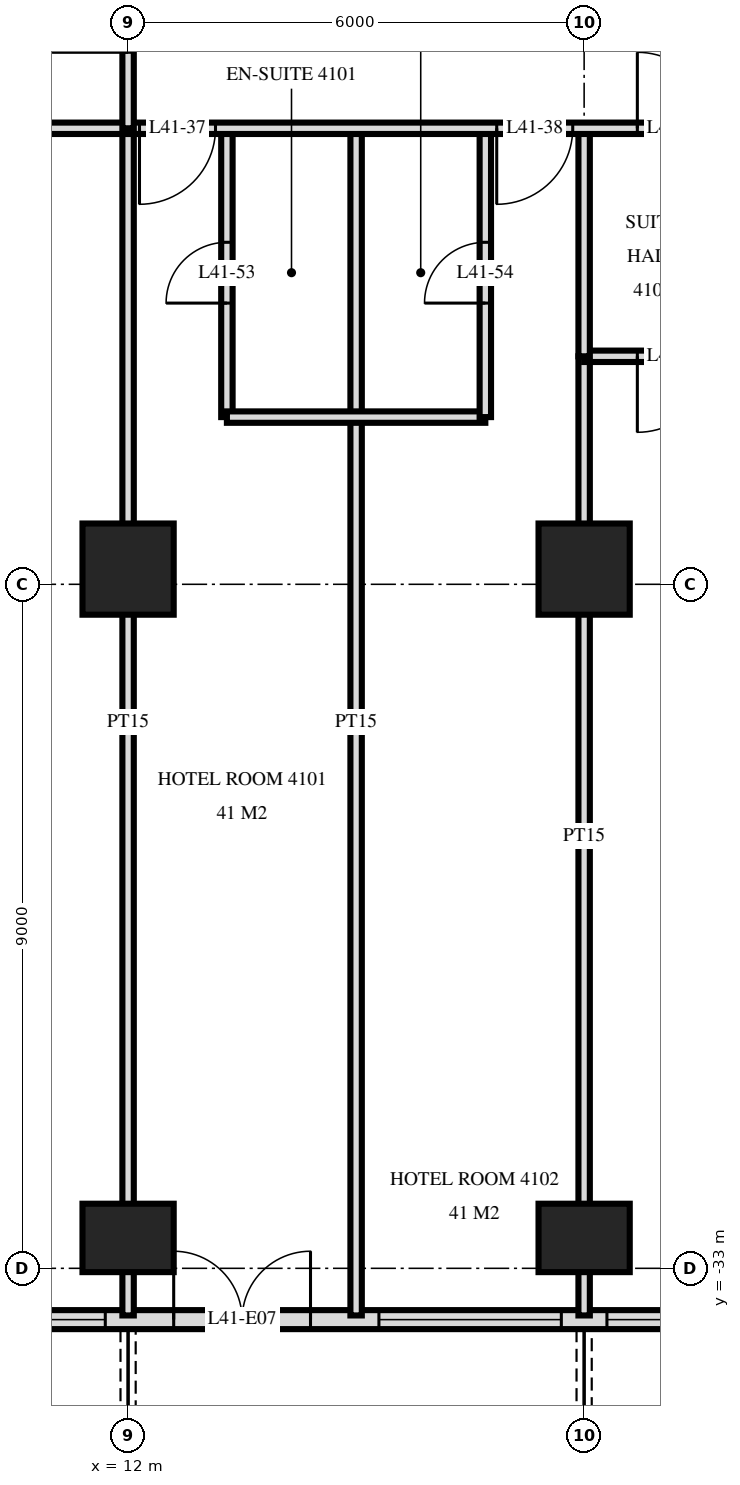
"""IFC4 building model, lengths in metres.
Left out: names, types, materials, properties, quantities, classifications, styles, units other than length and angle.
Written with IfcOpenShell. Run it as: python <this file> out.ifc"""

import sys

from ifc_helpers import new_model, si_unit, direction, frame, frame_2d, origin, origin_2d, place, context, subcontext, project, spatial, rectangle, extrude, element, fill, save


model = new_model("IFC4")
c1 = context("Model", 3, precision=1e-05, world=origin(), true_north=direction((0.0, 1.0)))
c2 = subcontext(c1, "Body", "Model", "MODEL_VIEW")
j1 = project(units=[si_unit("LENGTHUNIT", "METRE"), si_unit("PLANEANGLEUNIT", "RADIAN")], contexts=[c1])
p1 = place(None, origin())
s1 = spatial("IfcSite", under=j1, at=p1, CompositionType="ELEMENT")
p2 = place(p1, origin())
s2 = spatial("IfcBuilding", under=s1, at=p2, CompositionType="ELEMENT")
p3 = place(p2, frame((0.0, 0.0, 159.6)))
s3 = spatial("IfcBuildingStorey", under=s2, at=p3, CompositionType="ELEMENT", Elevation=159.6)
p4 = place(p3, frame((12.0, -32.6, 0.0), z_axis=(0.0, 0.0, 1.0), x_axis=(1.0, 0.0, 0.0)))
e1 = element("IfcColumn", 1, at=p4, inside=s3, PredefinedType="COLUMN", context=c2, shape_type="SweptSolid", body=[
    extrude(rectangle(XDim=1.2, YDim=0.9, at=origin_2d()), origin(), (0.0, 0.0, 1.0), 3.6),
])
p5 = place(p3, frame((12.0, -23.8, 0.0), z_axis=(0.0, 0.0, 1.0), x_axis=(1.0, 0.0, 0.0)))
e2 = element("IfcColumn", 2, at=p5, inside=s3, PredefinedType="COLUMN", context=c2, shape_type="SweptSolid", body=[
    extrude(rectangle(XDim=1.2, YDim=1.2, at=origin_2d()), origin(), (0.0, 0.0, 1.0), 3.6),
])
p6 = place(p3, frame((18.0, -32.6, 0.0), z_axis=(0.0, 0.0, 1.0), x_axis=(1.0, 0.0, 0.0)))
e3 = element("IfcColumn", 3, at=p6, inside=s3, PredefinedType="COLUMN", context=c2, shape_type="SweptSolid", body=[
    extrude(rectangle(XDim=1.2, YDim=0.9, at=origin_2d()), origin(), (0.0, 0.0, 1.0), 3.6),
])
p7 = place(p3, frame((18.0, -23.8, 0.0), z_axis=(0.0, 0.0, 1.0), x_axis=(1.0, 0.0, 0.0)))
e4 = element("IfcColumn", 4, at=p7, inside=s3, PredefinedType="COLUMN", context=c2, shape_type="SweptSolid", body=[
    extrude(rectangle(XDim=1.2, YDim=1.2, at=origin_2d()), origin(), (0.0, 0.0, 1.0), 3.6),
])
p8 = place(p3, frame((-23.675, -33.675, 0.0), z_axis=(0.0, 0.0, 1.0), x_axis=(1.0, 0.0, 0.0)))
e5 = element("IfcWall", 5, at=p8, inside=s3, PredefinedType="SOLIDWALL", context=c2, shape_type="SweptSolid", body=[
    extrude(rectangle(XDim=47.351, YDim=0.25, at=frame_2d((23.675, 0.0))), origin(), (0.0, 0.0, 1.0), 3.32),
])
p9 = place(p8, frame((0.575, 0.0, 0.0)))
e6 = element("IfcOpeningElement", 6, at=p9, cuts=e5, PredefinedType="OPENING", context=c2, shape_type="SweptSolid", body=[
    extrude(rectangle(XDim=1.8, YDim=2.4, at=frame_2d((0.9, 1.2))), frame((0.0, 0.135, 0.0), z_axis=(0.0, -1.0, 0.0), x_axis=(1.0, 0.0, 0.0)), (0.0, 0.0, 1.0), 0.27),
])
p10 = place(p8, frame((3.425, 0.0, 0.3)))
e7 = element("IfcOpeningElement", 7, at=p10, cuts=e5, PredefinedType="OPENING", context=c2, shape_type="SweptSolid", body=[
    extrude(rectangle(XDim=1.8, YDim=2.1, at=frame_2d((0.9, 1.05))), frame((0.0, 0.135, 0.0), z_axis=(0.0, -1.0, 0.0), x_axis=(1.0, 0.0, 0.0)), (0.0, 0.0, 1.0), 0.27),
])
p11 = place(p8, frame((5.975, 0.0, 0.3)))
e8 = element("IfcOpeningElement", 8, at=p11, cuts=e5, PredefinedType="OPENING", context=c2, shape_type="SweptSolid", body=[
    extrude(rectangle(XDim=2.4, YDim=2.1, at=frame_2d((1.2, 1.05))), frame((0.0, 0.135, 0.0), z_axis=(0.0, -1.0, 0.0), x_axis=(1.0, 0.0, 0.0)), (0.0, 0.0, 1.0), 0.27),
])
p12 = place(p8, frame((9.275, 0.0, 0.0)))
e9 = element("IfcOpeningElement", 9, at=p12, cuts=e5, PredefinedType="OPENING", context=c2, shape_type="SweptSolid", body=[
    extrude(rectangle(XDim=1.8, YDim=2.4, at=frame_2d((0.9, 1.2))), frame((0.0, 0.135, 0.0), z_axis=(0.0, -1.0, 0.0), x_axis=(1.0, 0.0, 0.0)), (0.0, 0.0, 1.0), 0.27),
])
p13 = place(p8, frame((12.275, 0.0, 0.0)))
e10 = element("IfcOpeningElement", 10, at=p13, cuts=e5, PredefinedType="OPENING", context=c2, shape_type="SweptSolid", body=[
    extrude(rectangle(XDim=1.8, YDim=2.4, at=frame_2d((0.9, 1.2))), frame((0.0, 0.135, 0.0), z_axis=(0.0, -1.0, 0.0), x_axis=(1.0, 0.0, 0.0)), (0.0, 0.0, 1.0), 0.27),
])
p14 = place(p8, frame((14.975, 0.0, 0.3)))
e11 = element("IfcOpeningElement", 11, at=p14, cuts=e5, PredefinedType="OPENING", context=c2, shape_type="SweptSolid", body=[
    extrude(rectangle(XDim=2.4, YDim=2.1, at=frame_2d((1.2, 1.05))), frame((0.0, 0.135, 0.0), z_axis=(0.0, -1.0, 0.0), x_axis=(1.0, 0.0, 0.0)), (0.0, 0.0, 1.0), 0.27),
])
p15 = place(p8, frame((17.975, 0.0, 0.3)))
e12 = element("IfcOpeningElement", 12, at=p15, cuts=e5, PredefinedType="OPENING", context=c2, shape_type="SweptSolid", body=[
    extrude(rectangle(XDim=2.4, YDim=2.1, at=frame_2d((1.2, 1.05))), frame((0.0, 0.135, 0.0), z_axis=(0.0, -1.0, 0.0), x_axis=(1.0, 0.0, 0.0)), (0.0, 0.0, 1.0), 0.27),
])
p16 = place(p8, frame((21.275, 0.0, 0.0)))
e13 = element("IfcOpeningElement", 13, at=p16, cuts=e5, PredefinedType="OPENING", context=c2, shape_type="SweptSolid", body=[
    extrude(rectangle(XDim=1.8, YDim=2.4, at=frame_2d((0.9, 1.2))), frame((0.0, 0.135, 0.0), z_axis=(0.0, -1.0, 0.0), x_axis=(1.0, 0.0, 0.0)), (0.0, 0.0, 1.0), 0.27),
])
p17 = place(p8, frame((24.275, 0.0, 0.0)))
e14 = element("IfcOpeningElement", 14, at=p17, cuts=e5, PredefinedType="OPENING", context=c2, shape_type="SweptSolid", body=[
    extrude(rectangle(XDim=1.8, YDim=2.4, at=frame_2d((0.9, 1.2))), frame((0.0, 0.135, 0.0), z_axis=(0.0, -1.0, 0.0), x_axis=(1.0, 0.0, 0.0)), (0.0, 0.0, 1.0), 0.27),
])
p18 = place(p8, frame((26.975, 0.0, 0.3)))
e15 = element("IfcOpeningElement", 15, at=p18, cuts=e5, PredefinedType="OPENING", context=c2, shape_type="SweptSolid", body=[
    extrude(rectangle(XDim=2.4, YDim=2.1, at=frame_2d((1.2, 1.05))), frame((0.0, 0.135, 0.0), z_axis=(0.0, -1.0, 0.0), x_axis=(1.0, 0.0, 0.0)), (0.0, 0.0, 1.0), 0.27),
])
p19 = place(p8, frame((30.275, 0.0, 0.0)))
e16 = element("IfcOpeningElement", 16, at=p19, cuts=e5, PredefinedType="OPENING", context=c2, shape_type="SweptSolid", body=[
    extrude(rectangle(XDim=1.8, YDim=2.4, at=frame_2d((0.9, 1.2))), frame((0.0, 0.135, 0.0), z_axis=(0.0, -1.0, 0.0), x_axis=(1.0, 0.0, 0.0)), (0.0, 0.0, 1.0), 0.27),
])
p20 = place(p8, frame((32.975, 0.0, 0.3)))
e17 = element("IfcOpeningElement", 17, at=p20, cuts=e5, PredefinedType="OPENING", context=c2, shape_type="SweptSolid", body=[
    extrude(rectangle(XDim=2.4, YDim=2.1, at=frame_2d((1.2, 1.05))), frame((0.0, 0.135, 0.0), z_axis=(0.0, -1.0, 0.0), x_axis=(1.0, 0.0, 0.0)), (0.0, 0.0, 1.0), 0.27),
])
p21 = place(p8, frame((36.275, 0.0, 0.0)))
e18 = element("IfcOpeningElement", 18, at=p21, cuts=e5, PredefinedType="OPENING", context=c2, shape_type="SweptSolid", body=[
    extrude(rectangle(XDim=1.8, YDim=2.4, at=frame_2d((0.9, 1.2))), frame((0.0, 0.135, 0.0), z_axis=(0.0, -1.0, 0.0), x_axis=(1.0, 0.0, 0.0)), (0.0, 0.0, 1.0), 0.27),
])
p22 = place(p8, frame((38.975, 0.0, 0.3)))
e19 = element("IfcOpeningElement", 19, at=p22, cuts=e5, PredefinedType="OPENING", context=c2, shape_type="SweptSolid", body=[
    extrude(rectangle(XDim=2.4, YDim=2.1, at=frame_2d((1.2, 1.05))), frame((0.0, 0.135, 0.0), z_axis=(0.0, -1.0, 0.0), x_axis=(1.0, 0.0, 0.0)), (0.0, 0.0, 1.0), 0.27),
])
p23 = place(p8, frame((41.975, 0.0, 0.3)))
e20 = element("IfcOpeningElement", 20, at=p23, cuts=e5, PredefinedType="OPENING", context=c2, shape_type="SweptSolid", body=[
    extrude(rectangle(XDim=2.4, YDim=2.1, at=frame_2d((1.2, 1.05))), frame((0.0, 0.135, 0.0), z_axis=(0.0, -1.0, 0.0), x_axis=(1.0, 0.0, 0.0)), (0.0, 0.0, 1.0), 0.27),
])
p24 = place(p8, frame((45.125, 0.0, 0.0)))
e21 = element("IfcOpeningElement", 21, at=p24, cuts=e5, PredefinedType="OPENING", context=c2, shape_type="SweptSolid", body=[
    extrude(rectangle(XDim=1.8, YDim=2.4, at=frame_2d((0.9, 1.2))), frame((0.0, 0.135, 0.0), z_axis=(0.0, -1.0, 0.0), x_axis=(1.0, 0.0, 0.0)), (0.0, 0.0, 1.0), 0.27),
])
p25 = place(p3, frame((18.0, -21.0, 0.0), z_axis=(0.0, 0.0, 1.0), x_axis=(0.0, 1.0, 0.0)))
e22 = element("IfcWall", 22, at=p25, inside=s3, PredefinedType="PARTITIONING", context=c2, shape_type="SweptSolid", body=[
    extrude(rectangle(XDim=3.0, YDim=0.15, at=frame_2d((1.5, 0.0))), origin(), (0.0, 0.0, 1.0), 3.32),
])
p26 = place(p3, frame((18.0, -33.62, 0.0), z_axis=(0.0, 0.0, 1.0), x_axis=(0.0, 1.0, 0.0)))
e23 = element("IfcWall", 23, at=p26, inside=s3, PredefinedType="PARTITIONING", context=c2, shape_type="SweptSolid", body=[
    extrude(rectangle(XDim=12.62, YDim=0.15, at=frame_2d((6.31, 0.0))), origin(), (0.0, 0.0, 1.0), 3.32),
])
p27 = place(p3, frame((16.7, -21.8, 0.0), z_axis=(0.0, 0.0, 1.0), x_axis=(0.0, 1.0, 0.0)))
e24 = element("IfcWall", 24, at=p27, inside=s3, PredefinedType="PARTITIONING", context=c2, shape_type="SweptSolid", body=[
    extrude(rectangle(XDim=3.8, YDim=0.15, at=frame_2d((1.9, 0.0))), origin(), (0.0, 0.0, 1.0), 3.32),
])
p28 = place(p27, frame((1.5, 0.0, 0.0)))
e25 = element("IfcOpeningElement", 25, at=p28, cuts=e24, PredefinedType="OPENING", context=c2, shape_type="SweptSolid", body=[
    extrude(rectangle(XDim=0.8, YDim=2.1, at=frame_2d((0.4, 1.05))), frame((0.0, 0.085, 0.0), z_axis=(0.0, -1.0, 0.0), x_axis=(1.0, 0.0, 0.0)), (0.0, 0.0, 1.0), 0.17),
])
p29 = place(p3, frame((15.0, -33.62, 0.0), z_axis=(0.0, 0.0, 1.0), x_axis=(0.0, 1.0, 0.0)))
e26 = element("IfcWall", 26, at=p29, inside=s3, PredefinedType="PARTITIONING", context=c2, shape_type="SweptSolid", body=[
    extrude(rectangle(XDim=15.62, YDim=0.15, at=frame_2d((7.81, 0.0))), origin(), (0.0, 0.0, 1.0), 3.32),
])
p30 = place(p3, frame((13.3, -21.8, 0.0), z_axis=(0.0, 0.0, 1.0), x_axis=(0.0, 1.0, 0.0)))
e27 = element("IfcWall", 27, at=p30, inside=s3, PredefinedType="PARTITIONING", context=c2, shape_type="SweptSolid", body=[
    extrude(rectangle(XDim=3.8, YDim=0.15, at=frame_2d((1.9, 0.0))), origin(), (0.0, 0.0, 1.0), 3.32),
])
p31 = place(p30, frame((1.5, 0.0, 0.0)))
e28 = element("IfcOpeningElement", 28, at=p31, cuts=e27, PredefinedType="OPENING", context=c2, shape_type="SweptSolid", body=[
    extrude(rectangle(XDim=0.8, YDim=2.1, at=frame_2d((0.4, 1.05))), frame((0.0, 0.085, 0.0), z_axis=(0.0, -1.0, 0.0), x_axis=(1.0, 0.0, 0.0)), (0.0, 0.0, 1.0), 0.17),
])
p32 = place(p3, frame((12.0, -18.0, 0.0), z_axis=(0.0, 0.0, 1.0), x_axis=(0.0, 1.0, 0.0)))
e29 = element("IfcWall", 29, at=p32, inside=s3, PredefinedType="PARTITIONING", context=c2, shape_type="SweptSolid", body=[
    extrude(rectangle(XDim=2.95, YDim=0.15, at=frame_2d((1.475, 0.0))), origin(), (0.0, 0.0, 1.0), 3.32),
])
p33 = place(p32, frame((1.0, 0.0, 0.0)))
e30 = element("IfcOpeningElement", 30, at=p33, cuts=e29, PredefinedType="OPENING", context=c2, shape_type="SweptSolid", body=[
    extrude(rectangle(XDim=1.0, YDim=2.1, at=frame_2d((0.5, 1.05))), frame((0.0, 0.085, 0.0), z_axis=(0.0, -1.0, 0.0), x_axis=(1.0, 0.0, 0.0)), (0.0, 0.0, 1.0), 0.17),
])
p34 = place(p3, frame((12.0, -33.62, 0.0), z_axis=(0.0, 0.0, 1.0), x_axis=(0.0, 1.0, 0.0)))
e31 = element("IfcWall", 31, at=p34, inside=s3, PredefinedType="PARTITIONING", context=c2, shape_type="SweptSolid", body=[
    extrude(rectangle(XDim=15.62, YDim=0.15, at=frame_2d((7.81, 0.0))), origin(), (0.0, 0.0, 1.0), 3.32),
])
p35 = place(p3, frame((13.3, -21.8, 0.0), z_axis=(0.0, 0.0, 1.0), x_axis=(1.0, 0.0, 0.0)))
e32 = element("IfcWall", 32, at=p35, inside=s3, PredefinedType="PARTITIONING", context=c2, shape_type="SweptSolid", body=[
    extrude(rectangle(XDim=3.4, YDim=0.15, at=frame_2d((1.7, 0.0))), origin(), (0.0, 0.0, 1.0), 3.32),
])
p36 = place(p3, frame((18.0, -21.0, 0.0), z_axis=(0.0, 0.0, 1.0), x_axis=(1.0, 0.0, 0.0)))
e33 = element("IfcWall", 33, at=p36, inside=s3, PredefinedType="PARTITIONING", context=c2, shape_type="SweptSolid", body=[
    extrude(rectangle(XDim=2.4, YDim=0.15, at=frame_2d((1.2, 0.0))), origin(), (0.0, 0.0, 1.0), 3.32),
])
p37 = place(p36, frame((0.7, 0.0, 0.0)))
e34 = element("IfcOpeningElement", 34, at=p37, cuts=e33, PredefinedType="OPENING", context=c2, shape_type="SweptSolid", body=[
    extrude(rectangle(XDim=1.0, YDim=2.1, at=frame_2d((0.5, 1.05))), frame((0.0, 0.085, 0.0), z_axis=(0.0, -1.0, 0.0), x_axis=(1.0, 0.0, 0.0)), (0.0, 0.0, 1.0), 0.17),
])
p38 = place(p3, frame((-28.02, -18.0, 0.0), z_axis=(0.0, 0.0, 1.0), x_axis=(1.0, 0.0, 0.0)))
e35 = element("IfcWall", 35, at=p38, inside=s3, PredefinedType="PARTITIONING", context=c2, shape_type="SweptSolid", body=[
    extrude(rectangle(XDim=56.04, YDim=0.15, at=frame_2d((28.02, 0.0))), origin(), (0.0, 0.0, 1.0), 3.32),
])
p39 = place(p38, frame((14.32, 0.0, 0.0)))
e36 = element("IfcOpeningElement", 36, at=p39, cuts=e35, PredefinedType="OPENING", context=c2, shape_type="SweptSolid", body=[
    extrude(rectangle(XDim=1.0, YDim=2.1, at=frame_2d((0.5, 1.05))), frame((0.0, 0.085, 0.0), z_axis=(0.0, -1.0, 0.0), x_axis=(1.0, 0.0, 0.0)), (0.0, 0.0, 1.0), 0.17),
])
p40 = place(p38, frame((40.17, 0.0, 0.0)))
e37 = element("IfcOpeningElement", 37, at=p40, cuts=e35, PredefinedType="OPENING", context=c2, shape_type="SweptSolid", body=[
    extrude(rectangle(XDim=1.0, YDim=2.1, at=frame_2d((0.5, 1.05))), frame((0.0, 0.085, 0.0), z_axis=(0.0, -1.0, 0.0), x_axis=(1.0, 0.0, 0.0)), (0.0, 0.0, 1.0), 0.17),
])
p41 = place(p38, frame((44.87, 0.0, 0.0)))
e38 = element("IfcOpeningElement", 38, at=p41, cuts=e35, PredefinedType="OPENING", context=c2, shape_type="SweptSolid", body=[
    extrude(rectangle(XDim=1.0, YDim=2.1, at=frame_2d((0.5, 1.05))), frame((0.0, 0.085, 0.0), z_axis=(0.0, -1.0, 0.0), x_axis=(1.0, 0.0, 0.0)), (0.0, 0.0, 1.0), 0.17),
])
p42 = place(p38, frame((46.72, 0.0, 0.0)))
e39 = element("IfcOpeningElement", 39, at=p42, cuts=e35, PredefinedType="OPENING", context=c2, shape_type="SweptSolid", body=[
    extrude(rectangle(XDim=1.0, YDim=2.1, at=frame_2d((0.5, 1.05))), frame((0.0, 0.085, 0.0), z_axis=(0.0, -1.0, 0.0), x_axis=(1.0, 0.0, 0.0)), (0.0, 0.0, 1.0), 0.17),
])
p43 = place(p38, frame((18.52, 0.0, 0.0)))
e40 = element("IfcOpeningElement", 40, at=p43, cuts=e35, PredefinedType="OPENING", context=c2, shape_type="SweptSolid", body=[
    extrude(rectangle(XDim=1.0, YDim=2.1, at=frame_2d((0.5, 1.05))), frame((0.0, 0.085, 0.0), z_axis=(0.0, -1.0, 0.0), x_axis=(1.0, 0.0, 0.0)), (0.0, 0.0, 1.0), 0.17),
])
p44 = place(p38, frame((24.52, 0.0, 0.0)))
e41 = element("IfcOpeningElement", 41, at=p44, cuts=e35, PredefinedType="OPENING", context=c2, shape_type="SweptSolid", body=[
    extrude(rectangle(XDim=1.0, YDim=2.1, at=frame_2d((0.5, 1.05))), frame((0.0, 0.085, 0.0), z_axis=(0.0, -1.0, 0.0), x_axis=(1.0, 0.0, 0.0)), (0.0, 0.0, 1.0), 0.17),
])
p45 = place(p38, frame((30.52, 0.0, 0.0)))
e42 = element("IfcOpeningElement", 42, at=p45, cuts=e35, PredefinedType="OPENING", context=c2, shape_type="SweptSolid", body=[
    extrude(rectangle(XDim=1.0, YDim=2.1, at=frame_2d((0.5, 1.05))), frame((0.0, 0.085, 0.0), z_axis=(0.0, -1.0, 0.0), x_axis=(1.0, 0.0, 0.0)), (0.0, 0.0, 1.0), 0.17),
])
p46 = place(p38, frame((36.52, 0.0, 0.0)))
e43 = element("IfcOpeningElement", 43, at=p46, cuts=e35, PredefinedType="OPENING", context=c2, shape_type="SweptSolid", body=[
    extrude(rectangle(XDim=1.0, YDim=2.1, at=frame_2d((0.5, 1.05))), frame((0.0, 0.085, 0.0), z_axis=(0.0, -1.0, 0.0), x_axis=(1.0, 0.0, 0.0)), (0.0, 0.0, 1.0), 0.17),
])
p47 = place(p20, origin())
e44 = element("IfcWindow", 44, at=p47, inside=s3, PartitioningType="SINGLE_PANEL", PredefinedType="WINDOW", context=c2, shape_type="SweptSolid", body=[
    extrude(rectangle(XDim=2.4, YDim=2.1, at=frame_2d((1.2, 1.05))), frame((0.0, 0.03, 0.0), z_axis=(0.0, -1.0, 0.0), x_axis=(1.0, 0.0, 0.0)), (0.0, 0.0, 1.0), 0.06),
])
fill(e17, e44)
p48 = place(p21, origin())
e45 = element("IfcDoor", 45, at=p48, inside=s3, OperationType="DOUBLE_DOOR_SINGLE_SWING", PredefinedType="DOOR", context=c2, shape_type="SweptSolid", body=[
    extrude(rectangle(XDim=1.8, YDim=2.4, at=frame_2d((0.9, 1.2))), frame((0.0, 0.025, 0.0), z_axis=(0.0, -1.0, 0.0), x_axis=(1.0, 0.0, 0.0)), (0.0, 0.0, 1.0), 0.05),
])
fill(e18, e45)
p49 = place(p22, origin())
e46 = element("IfcWindow", 46, at=p49, inside=s3, PartitioningType="SINGLE_PANEL", PredefinedType="WINDOW", context=c2, shape_type="SweptSolid", body=[
    extrude(rectangle(XDim=2.4, YDim=2.1, at=frame_2d((1.2, 1.05))), frame((0.0, 0.03, 0.0), z_axis=(0.0, -1.0, 0.0), x_axis=(1.0, 0.0, 0.0)), (0.0, 0.0, 1.0), 0.06),
])
fill(e19, e46)
p50 = place(p23, origin())
e47 = element("IfcWindow", 47, at=p50, inside=s3, PartitioningType="SINGLE_PANEL", PredefinedType="WINDOW", context=c2, shape_type="SweptSolid", body=[
    extrude(rectangle(XDim=2.4, YDim=2.1, at=frame_2d((1.2, 1.05))), frame((0.0, 0.03, 0.0), z_axis=(0.0, -1.0, 0.0), x_axis=(1.0, 0.0, 0.0)), (0.0, 0.0, 1.0), 0.06),
])
fill(e20, e47)
p51 = place(p40, frame((0.5, 0.0, 0.0), z_axis=(0.0, 0.0, 1.0), x_axis=(-1.0, 0.0, 0.0)))
e48 = element("IfcDoor", 48, at=p51, inside=s3, OperationType="SINGLE_SWING_LEFT", PredefinedType="DOOR", context=c2, shape_type="SweptSolid", body=[
    extrude(rectangle(XDim=1.0, YDim=2.1, at=frame_2d((0.0, 1.05))), frame((0.0, -0.025, 0.0), z_axis=(0.0, 1.0, 0.0), x_axis=(-1.0, 0.0, 0.0)), (0.0, 0.0, 1.0), 0.05),
])
fill(e37, e48)
p52 = place(p41, frame((0.5, 0.0, 0.0), z_axis=(0.0, 0.0, 1.0), x_axis=(-1.0, 0.0, 0.0)))
e49 = element("IfcDoor", 49, at=p52, inside=s3, OperationType="SINGLE_SWING_LEFT", PredefinedType="DOOR", context=c2, shape_type="SweptSolid", body=[
    extrude(rectangle(XDim=1.0, YDim=2.1, at=frame_2d((0.0, 1.05))), frame((0.0, -0.025, 0.0), z_axis=(0.0, 1.0, 0.0), x_axis=(-1.0, 0.0, 0.0)), (0.0, 0.0, 1.0), 0.05),
])
fill(e38, e49)
p53 = place(p42, origin())
e50 = element("IfcDoor", 50, at=p53, inside=s3, OperationType="SINGLE_SWING_RIGHT", PredefinedType="DOOR", context=c2, shape_type="SweptSolid", body=[
    extrude(rectangle(XDim=1.0, YDim=2.1, at=frame_2d((0.5, 1.05))), frame((0.0, 0.025, 0.0), z_axis=(0.0, -1.0, 0.0), x_axis=(1.0, 0.0, 0.0)), (0.0, 0.0, 1.0), 0.05),
])
fill(e39, e50)
p54 = place(p31, origin())
e51 = element("IfcDoor", 51, at=p54, inside=s3, OperationType="SINGLE_SWING_RIGHT", PredefinedType="DOOR", context=c2, shape_type="SweptSolid", body=[
    extrude(rectangle(XDim=0.8, YDim=2.1, at=frame_2d((0.4, 1.05))), frame((0.0, 0.025, 0.0), z_axis=(0.0, -1.0, 0.0), x_axis=(1.0, 0.0, 0.0)), (0.0, 0.0, 1.0), 0.05),
])
fill(e28, e51)
p55 = place(p28, origin())
e52 = element("IfcDoor", 52, at=p55, inside=s3, OperationType="SINGLE_SWING_RIGHT", PredefinedType="DOOR", context=c2, shape_type="SweptSolid", body=[
    extrude(rectangle(XDim=0.8, YDim=2.1, at=frame_2d((0.4, 1.05))), frame((0.0, 0.025, 0.0), z_axis=(0.0, -1.0, 0.0), x_axis=(1.0, 0.0, 0.0)), (0.0, 0.0, 1.0), 0.05),
])
fill(e25, e52)
p56 = place(p37, frame((0.5, 0.0, 0.0), z_axis=(0.0, 0.0, 1.0), x_axis=(-1.0, 0.0, 0.0)))
e53 = element("IfcDoor", 53, at=p56, inside=s3, OperationType="SINGLE_SWING_LEFT", PredefinedType="DOOR", context=c2, shape_type="SweptSolid", body=[
    extrude(rectangle(XDim=1.0, YDim=2.1, at=frame_2d((0.0, 1.05))), frame((0.0, -0.025, 0.0), z_axis=(0.0, 1.0, 0.0), x_axis=(-1.0, 0.0, 0.0)), (0.0, 0.0, 1.0), 0.05),
])
fill(e34, e53)
save(model, sys.argv[1])
